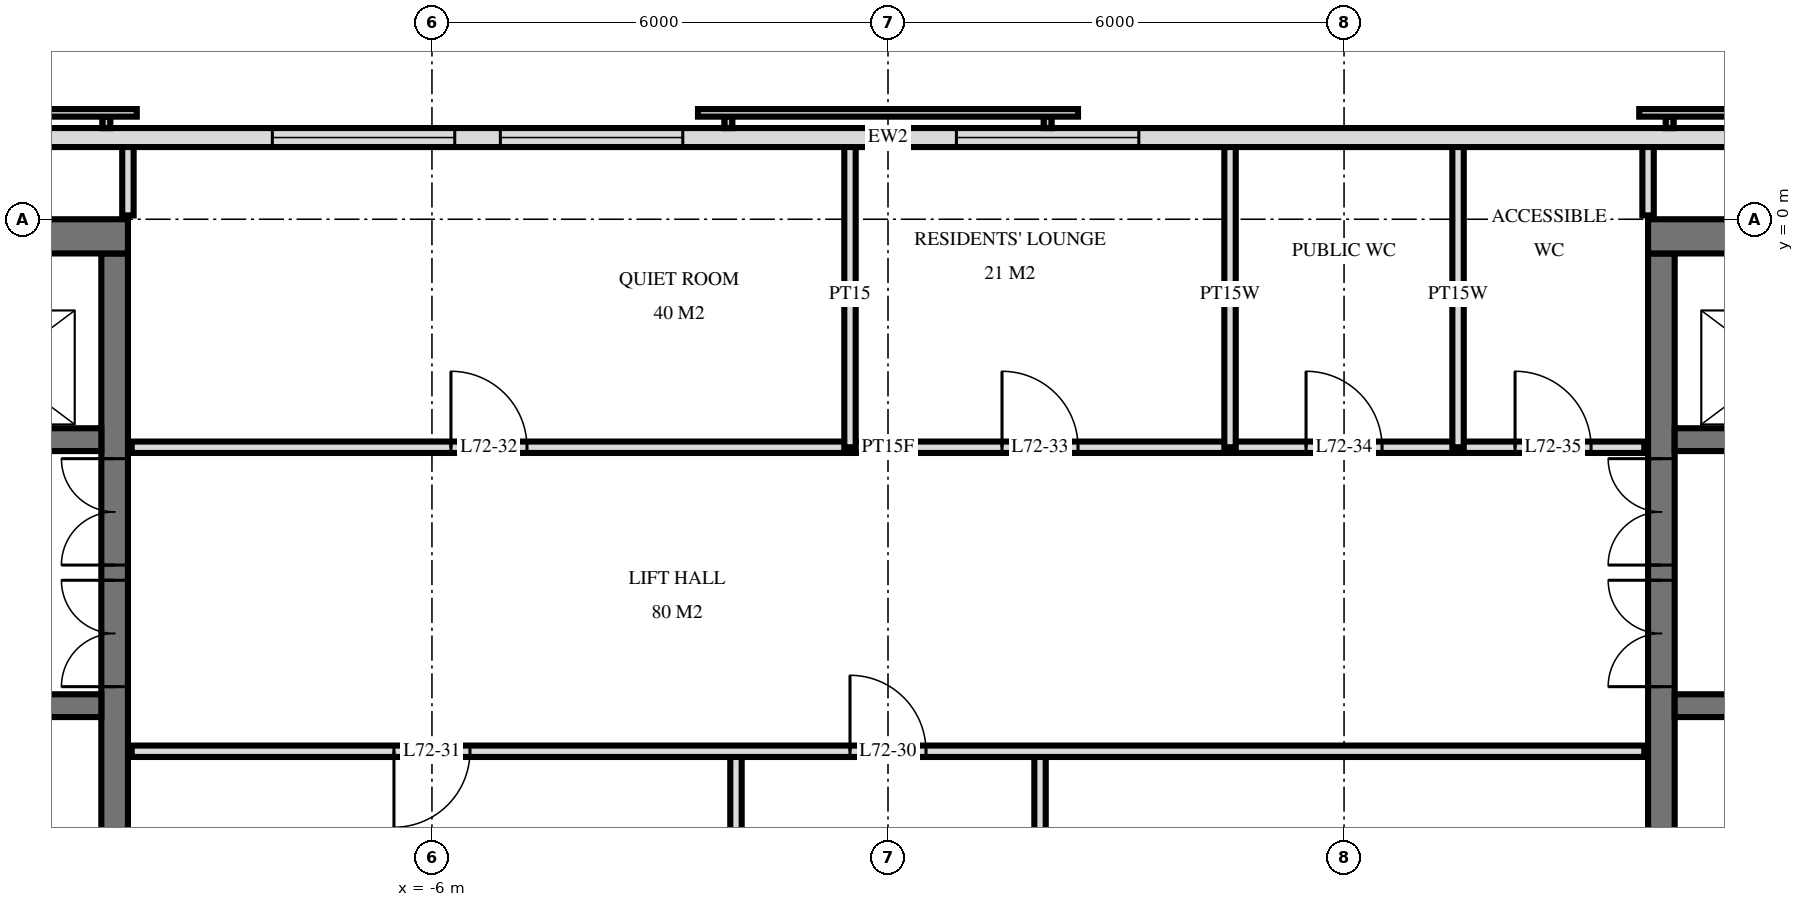
"""IFC4 building model, lengths in metres.
Left out: names, types, materials, properties, quantities, classifications, styles, units other than length and angle.
Written with IfcOpenShell. Run it as: python <this file> out.ifc"""

import sys

from ifc_helpers import new_model, si_unit, direction, frame, frame_2d, origin, place, context, subcontext, project, spatial, rectangle, extrude, element, fill, save


model = new_model("IFC4")
c1 = context("Model", 3, precision=1e-05, world=origin(), true_north=direction((0.0, 1.0)))
c2 = subcontext(c1, "Body", "Model", "MODEL_VIEW")
j1 = project(units=[si_unit("LENGTHUNIT", "METRE"), si_unit("PLANEANGLEUNIT", "RADIAN")], contexts=[c1])
p1 = place(None, origin())
s1 = spatial("IfcSite", under=j1, at=p1, CompositionType="ELEMENT")
p2 = place(p1, origin())
s2 = spatial("IfcBuilding", under=s1, at=p2, CompositionType="ELEMENT")
p3 = place(p2, frame((0.0, 0.0, 273.6)))
s3 = spatial("IfcBuildingStorey", under=s2, at=p3, CompositionType="ELEMENT", Elevation=273.6)
p4 = place(p3, frame((-19.5, -0.225, 0.0), z_axis=(0.0, 0.0, 1.0), x_axis=(1.0, 0.0, 0.0)))
e1 = element("IfcWall", 1, at=p4, inside=s3, PredefinedType="SHEAR", context=c2, shape_type="SweptSolid", body=[
    extrude(rectangle(XDim=9.5, YDim=0.45, at=frame_2d((4.75, 0.0))), origin(), (0.0, 0.0, 1.0), 3.5),
])
p5 = place(p3, frame((-10.175, -14.55, 0.0), z_axis=(0.0, 0.0, 1.0), x_axis=(0.0, 1.0, 0.0)))
e2 = element("IfcWall", 2, at=p5, inside=s3, PredefinedType="SHEAR", context=c2, shape_type="SweptSolid", body=[
    extrude(rectangle(XDim=14.1, YDim=0.35, at=frame_2d((7.05, 0.0))), origin(), (0.0, 0.0, 1.0), 3.5),
])
p6 = place(p5, frame((8.4, 0.0, 0.0)))
e3 = element("IfcOpeningElement", 3, at=p6, cuts=e2, PredefinedType="OPENING", context=c2, shape_type="SweptSolid", body=[
    extrude(rectangle(XDim=1.4, YDim=2.4, at=frame_2d((0.7, 1.2))), frame((0.0, 0.185, 0.0), z_axis=(0.0, -1.0, 0.0), x_axis=(1.0, 0.0, 0.0)), (0.0, 0.0, 1.0), 0.37),
])
p7 = place(p5, frame((10.0, 0.0, 0.0)))
e4 = element("IfcOpeningElement", 4, at=p7, cuts=e2, PredefinedType="OPENING", context=c2, shape_type="SweptSolid", body=[
    extrude(rectangle(XDim=1.4, YDim=2.4, at=frame_2d((0.7, 1.2))), frame((0.0, 0.185, 0.0), z_axis=(0.0, -1.0, 0.0), x_axis=(1.0, 0.0, 0.0)), (0.0, 0.0, 1.0), 0.37),
])
p8 = place(p5, frame((4.0, 0.0, 0.0)))
e5 = element("IfcOpeningElement", 5, at=p8, cuts=e2, PredefinedType="OPENING", context=c2, shape_type="SweptSolid", body=[
    extrude(rectangle(XDim=1.2, YDim=2.1, at=frame_2d((0.6, 1.05))), frame((0.0, 0.185, 0.0), z_axis=(0.0, -1.0, 0.0), x_axis=(1.0, 0.0, 0.0)), (0.0, 0.0, 1.0), 0.37),
])
p9 = place(p3, frame((-19.05, -2.9, 0.0), z_axis=(0.0, 0.0, 1.0), x_axis=(1.0, 0.0, 0.0)))
e6 = element("IfcWall", 6, at=p9, inside=s3, PredefinedType="SHEAR", context=c2, shape_type="SweptSolid", body=[
    extrude(rectangle(XDim=8.7, YDim=0.3, at=frame_2d((4.35, 0.0))), origin(), (0.0, 0.0, 1.0), 3.5),
])
p10 = place(p9, frame((6.8, 0.0, 0.0)))
e7 = element("IfcOpeningElement", 7, at=p10, cuts=e6, PredefinedType="OPENING", context=c2, shape_type="SweptSolid", body=[
    extrude(rectangle(XDim=1.1, YDim=2.1, at=frame_2d((0.55, 1.05))), frame((0.0, 0.16, 0.0), z_axis=(0.0, -1.0, 0.0), x_axis=(1.0, 0.0, 0.0)), (0.0, 0.0, 1.0), 0.32),
])
p11 = place(p9, frame((3.8, 0.0, 0.0)))
e8 = element("IfcOpeningElement", 8, at=p11, cuts=e6, PredefinedType="OPENING", context=c2, shape_type="SweptSolid", body=[
    extrude(rectangle(XDim=1.1, YDim=2.1, at=frame_2d((0.55, 1.05))), frame((0.0, 0.16, 0.0), z_axis=(0.0, -1.0, 0.0), x_axis=(1.0, 0.0, 0.0)), (0.0, 0.0, 1.0), 0.32),
])
p12 = place(p9, frame((0.9, 0.0, 0.0)))
e9 = element("IfcOpeningElement", 9, at=p12, cuts=e6, PredefinedType="OPENING", context=c2, shape_type="SweptSolid", body=[
    extrude(rectangle(XDim=0.9, YDim=2.1, at=frame_2d((0.45, 1.05))), frame((0.0, 0.16, 0.0), z_axis=(0.0, -1.0, 0.0), x_axis=(1.0, 0.0, 0.0)), (0.0, 0.0, 1.0), 0.32),
])
p13 = place(p3, frame((-19.05, -6.4, 0.0), z_axis=(0.0, 0.0, 1.0), x_axis=(1.0, 0.0, 0.0)))
e10 = element("IfcWall", 10, at=p13, inside=s3, PredefinedType="SHEAR", context=c2, shape_type="SweptSolid", body=[
    extrude(rectangle(XDim=8.7, YDim=0.3, at=frame_2d((4.35, 0.0))), origin(), (0.0, 0.0, 1.0), 3.5),
])
p14 = place(p13, frame((0.8, 0.0, 0.0)))
e11 = element("IfcOpeningElement", 11, at=p14, cuts=e10, PredefinedType="OPENING", context=c2, shape_type="SweptSolid", body=[
    extrude(rectangle(XDim=1.1, YDim=2.1, at=frame_2d((0.55, 1.05))), frame((0.0, 0.16, 0.0), z_axis=(0.0, -1.0, 0.0), x_axis=(1.0, 0.0, 0.0)), (0.0, 0.0, 1.0), 0.32),
])
p15 = place(p3, frame((10.0, -0.225, 0.0), z_axis=(0.0, 0.0, 1.0), x_axis=(1.0, 0.0, 0.0)))
e12 = element("IfcWall", 12, at=p15, inside=s3, PredefinedType="SHEAR", context=c2, shape_type="SweptSolid", body=[
    extrude(rectangle(XDim=9.5, YDim=0.45, at=frame_2d((4.75, 0.0))), origin(), (0.0, 0.0, 1.0), 3.5),
])
p16 = place(p3, frame((10.175, -14.55, 0.0), z_axis=(0.0, 0.0, 1.0), x_axis=(0.0, 1.0, 0.0)))
e13 = element("IfcWall", 13, at=p16, inside=s3, PredefinedType="SHEAR", context=c2, shape_type="SweptSolid", body=[
    extrude(rectangle(XDim=14.1, YDim=0.35, at=frame_2d((7.05, 0.0))), origin(), (0.0, 0.0, 1.0), 3.5),
])
p17 = place(p16, frame((8.4, 0.0, 0.0)))
e14 = element("IfcOpeningElement", 14, at=p17, cuts=e13, PredefinedType="OPENING", context=c2, shape_type="SweptSolid", body=[
    extrude(rectangle(XDim=1.4, YDim=2.4, at=frame_2d((0.7, 1.2))), frame((0.0, 0.185, 0.0), z_axis=(0.0, -1.0, 0.0), x_axis=(1.0, 0.0, 0.0)), (0.0, 0.0, 1.0), 0.37),
])
p18 = place(p16, frame((10.0, 0.0, 0.0)))
e15 = element("IfcOpeningElement", 15, at=p18, cuts=e13, PredefinedType="OPENING", context=c2, shape_type="SweptSolid", body=[
    extrude(rectangle(XDim=1.4, YDim=2.4, at=frame_2d((0.7, 1.2))), frame((0.0, 0.185, 0.0), z_axis=(0.0, -1.0, 0.0), x_axis=(1.0, 0.0, 0.0)), (0.0, 0.0, 1.0), 0.37),
])
p19 = place(p16, frame((4.0, 0.0, 0.0)))
e16 = element("IfcOpeningElement", 16, at=p19, cuts=e13, PredefinedType="OPENING", context=c2, shape_type="SweptSolid", body=[
    extrude(rectangle(XDim=1.2, YDim=2.1, at=frame_2d((0.6, 1.05))), frame((0.0, 0.185, 0.0), z_axis=(0.0, -1.0, 0.0), x_axis=(1.0, 0.0, 0.0)), (0.0, 0.0, 1.0), 0.37),
])
p20 = place(p3, frame((10.35, -2.9, 0.0), z_axis=(0.0, 0.0, 1.0), x_axis=(1.0, 0.0, 0.0)))
e17 = element("IfcWall", 17, at=p20, inside=s3, PredefinedType="SHEAR", context=c2, shape_type="SweptSolid", body=[
    extrude(rectangle(XDim=8.7, YDim=0.3, at=frame_2d((4.35, 0.0))), origin(), (0.0, 0.0, 1.0), 3.5),
])
p21 = place(p20, frame((0.8, 0.0, 0.0)))
e18 = element("IfcOpeningElement", 18, at=p21, cuts=e17, PredefinedType="OPENING", context=c2, shape_type="SweptSolid", body=[
    extrude(rectangle(XDim=1.1, YDim=2.1, at=frame_2d((0.55, 1.05))), frame((0.0, 0.16, 0.0), z_axis=(0.0, -1.0, 0.0), x_axis=(1.0, 0.0, 0.0)), (0.0, 0.0, 1.0), 0.32),
])
p22 = place(p20, frame((3.8, 0.0, 0.0)))
e19 = element("IfcOpeningElement", 19, at=p22, cuts=e17, PredefinedType="OPENING", context=c2, shape_type="SweptSolid", body=[
    extrude(rectangle(XDim=1.1, YDim=2.1, at=frame_2d((0.55, 1.05))), frame((0.0, 0.16, 0.0), z_axis=(0.0, -1.0, 0.0), x_axis=(1.0, 0.0, 0.0)), (0.0, 0.0, 1.0), 0.32),
])
p23 = place(p20, frame((6.9, 0.0, 0.0)))
e20 = element("IfcOpeningElement", 20, at=p23, cuts=e17, PredefinedType="OPENING", context=c2, shape_type="SweptSolid", body=[
    extrude(rectangle(XDim=0.9, YDim=2.1, at=frame_2d((0.45, 1.05))), frame((0.0, 0.16, 0.0), z_axis=(0.0, -1.0, 0.0), x_axis=(1.0, 0.0, 0.0)), (0.0, 0.0, 1.0), 0.32),
])
p24 = place(p3, frame((10.35, -6.4, 0.0), z_axis=(0.0, 0.0, 1.0), x_axis=(1.0, 0.0, 0.0)))
e21 = element("IfcWall", 21, at=p24, inside=s3, PredefinedType="SHEAR", context=c2, shape_type="SweptSolid", body=[
    extrude(rectangle(XDim=8.7, YDim=0.3, at=frame_2d((4.35, 0.0))), origin(), (0.0, 0.0, 1.0), 3.5),
])
p25 = place(p24, frame((6.8, 0.0, 0.0)))
e22 = element("IfcOpeningElement", 22, at=p25, cuts=e21, PredefinedType="OPENING", context=c2, shape_type="SweptSolid", body=[
    extrude(rectangle(XDim=1.1, YDim=2.1, at=frame_2d((0.55, 1.05))), frame((0.0, 0.16, 0.0), z_axis=(0.0, -1.0, 0.0), x_axis=(1.0, 0.0, 0.0)), (0.0, 0.0, 1.0), 0.32),
])
p26 = place(p3, frame((18.575, 1.075, 0.0), z_axis=(0.0, 0.0, 1.0), x_axis=(-1.0, 0.0, 0.0)))
e23 = element("IfcWall", 23, at=p26, inside=s3, PredefinedType="SOLIDWALL", context=c2, shape_type="SweptSolid", body=[
    extrude(rectangle(XDim=37.151, YDim=0.25, at=frame_2d((18.575, 0.0))), origin(), (0.0, 0.0, 1.0), 3.22),
])
p27 = place(p26, frame((15.275, 0.0, 0.9)))
e24 = element("IfcOpeningElement", 24, at=p27, cuts=e23, PredefinedType="OPENING", context=c2, shape_type="SweptSolid", body=[
    extrude(rectangle(XDim=2.4, YDim=1.5, at=frame_2d((1.2, 0.75))), frame((0.0, 0.135, 0.0), z_axis=(0.0, -1.0, 0.0), x_axis=(1.0, 0.0, 0.0)), (0.0, 0.0, 1.0), 0.27),
])
p28 = place(p26, frame((21.275, 0.0, 0.9)))
e25 = element("IfcOpeningElement", 25, at=p28, cuts=e23, PredefinedType="OPENING", context=c2, shape_type="SweptSolid", body=[
    extrude(rectangle(XDim=2.4, YDim=1.5, at=frame_2d((1.2, 0.75))), frame((0.0, 0.135, 0.0), z_axis=(0.0, -1.0, 0.0), x_axis=(1.0, 0.0, 0.0)), (0.0, 0.0, 1.0), 0.27),
])
p29 = place(p26, frame((24.275, 0.0, 0.9)))
e26 = element("IfcOpeningElement", 26, at=p29, cuts=e23, PredefinedType="OPENING", context=c2, shape_type="SweptSolid", body=[
    extrude(rectangle(XDim=2.4, YDim=1.5, at=frame_2d((1.2, 0.75))), frame((0.0, 0.135, 0.0), z_axis=(0.0, -1.0, 0.0), x_axis=(1.0, 0.0, 0.0)), (0.0, 0.0, 1.0), 0.27),
])
p30 = place(p3, frame((10.0, 0.05, 0.0), z_axis=(0.0, 0.0, 1.0), x_axis=(0.0, 1.0, 0.0)))
e27 = element("IfcWall", 27, at=p30, inside=s3, PredefinedType="PLUMBINGWALL", context=c2, shape_type="SweptSolid", body=[
    extrude(rectangle(XDim=0.97, YDim=0.15, at=frame_2d((0.485, 0.0))), origin(), (0.0, 0.0, 1.0), 3.22),
])
for number, where, z_axis, x_axis in (
    (28, (7.5, -3.0, 0.0), (0.0, 0.0, 1.0), (0.0, 1.0, 0.0)),
    (29, (4.5, -3.0, 0.0), (0.0, 0.0, 1.0), (0.0, 1.0, 0.0)),
):
    element("IfcWall", number, at=place(p3, frame(where, z_axis=z_axis, x_axis=x_axis)), inside=s3, PredefinedType="PLUMBINGWALL", context=c2, shape_type="SweptSolid", body=[
        extrude(rectangle(XDim=4.02, YDim=0.15, at=frame_2d((2.01, 0.0))), origin(), (0.0, 0.0, 1.0), 3.22),
    ])
p31 = place(p3, frame((2.0, -11.0, 0.0), z_axis=(0.0, 0.0, 1.0), x_axis=(0.0, 1.0, 0.0)))
e30 = element("IfcWall", 30, at=p31, inside=s3, PredefinedType="PARTITIONING", context=c2, shape_type="SweptSolid", body=[
    extrude(rectangle(XDim=4.0, YDim=0.15, at=frame_2d((2.0, 0.0))), origin(), (0.0, 0.0, 1.0), 3.22),
])
p32 = place(p3, frame((-0.5, -3.0, 0.0), z_axis=(0.0, 0.0, 1.0), x_axis=(0.0, 1.0, 0.0)))
e31 = element("IfcWall", 31, at=p32, inside=s3, PredefinedType="PARTITIONING", context=c2, shape_type="SweptSolid", body=[
    extrude(rectangle(XDim=4.02, YDim=0.15, at=frame_2d((2.01, 0.0))), origin(), (0.0, 0.0, 1.0), 3.22),
])
p33 = place(p3, frame((-2.0, -11.0, 0.0), z_axis=(0.0, 0.0, 1.0), x_axis=(0.0, 1.0, 0.0)))
e32 = element("IfcWall", 32, at=p33, inside=s3, PredefinedType="PARTITIONING", context=c2, shape_type="SweptSolid", body=[
    extrude(rectangle(XDim=4.0, YDim=0.15, at=frame_2d((2.0, 0.0))), origin(), (0.0, 0.0, 1.0), 3.22),
])
p34 = place(p3, frame((-10.0, 0.05, 0.0), z_axis=(0.0, 0.0, 1.0), x_axis=(0.0, 1.0, 0.0)))
e33 = element("IfcWall", 33, at=p34, inside=s3, PredefinedType="PARTITIONING", context=c2, shape_type="SweptSolid", body=[
    extrude(rectangle(XDim=0.97, YDim=0.15, at=frame_2d((0.485, 0.0))), origin(), (0.0, 0.0, 1.0), 3.22),
])
p35 = place(p3, frame((-9.95, -7.0, 0.0), z_axis=(0.0, 0.0, 1.0), x_axis=(1.0, 0.0, 0.0)))
e34 = element("IfcWall", 34, at=p35, inside=s3, PredefinedType="PARTITIONING", context=c2, shape_type="SweptSolid", body=[
    extrude(rectangle(XDim=19.9, YDim=0.15, at=frame_2d((9.95, 0.0))), origin(), (0.0, 0.0, 1.0), 3.22),
])
p36 = place(p35, frame((9.45, 0.0, 0.0)))
e35 = element("IfcOpeningElement", 35, at=p36, cuts=e34, PredefinedType="OPENING", context=c2, shape_type="SweptSolid", body=[
    extrude(rectangle(XDim=1.0, YDim=2.1, at=frame_2d((0.5, 1.05))), frame((0.0, 0.085, 0.0), z_axis=(0.0, -1.0, 0.0), x_axis=(1.0, 0.0, 0.0)), (0.0, 0.0, 1.0), 0.17),
])
p37 = place(p35, frame((3.45, 0.0, 0.0)))
e36 = element("IfcOpeningElement", 36, at=p37, cuts=e34, PredefinedType="OPENING", context=c2, shape_type="SweptSolid", body=[
    extrude(rectangle(XDim=1.0, YDim=2.1, at=frame_2d((0.5, 1.05))), frame((0.0, 0.085, 0.0), z_axis=(0.0, -1.0, 0.0), x_axis=(1.0, 0.0, 0.0)), (0.0, 0.0, 1.0), 0.17),
])
p38 = place(p3, frame((-9.95, -3.0, 0.0), z_axis=(0.0, 0.0, 1.0), x_axis=(1.0, 0.0, 0.0)))
e37 = element("IfcWall", 37, at=p38, inside=s3, PredefinedType="PARTITIONING", context=c2, shape_type="SweptSolid", body=[
    extrude(rectangle(XDim=19.9, YDim=0.15, at=frame_2d((9.95, 0.0))), origin(), (0.0, 0.0, 1.0), 3.22),
])
p39 = place(p38, frame((4.2, 0.0, 0.0)))
e38 = element("IfcOpeningElement", 38, at=p39, cuts=e37, PredefinedType="OPENING", context=c2, shape_type="SweptSolid", body=[
    extrude(rectangle(XDim=1.0, YDim=2.1, at=frame_2d((0.5, 1.05))), frame((0.0, 0.085, 0.0), z_axis=(0.0, -1.0, 0.0), x_axis=(1.0, 0.0, 0.0)), (0.0, 0.0, 1.0), 0.17),
])
p40 = place(p38, frame((11.45, 0.0, 0.0)))
e39 = element("IfcOpeningElement", 39, at=p40, cuts=e37, PredefinedType="OPENING", context=c2, shape_type="SweptSolid", body=[
    extrude(rectangle(XDim=1.0, YDim=2.1, at=frame_2d((0.5, 1.05))), frame((0.0, 0.085, 0.0), z_axis=(0.0, -1.0, 0.0), x_axis=(1.0, 0.0, 0.0)), (0.0, 0.0, 1.0), 0.17),
])
p41 = place(p38, frame((15.45, 0.0, 0.0)))
e40 = element("IfcOpeningElement", 40, at=p41, cuts=e37, PredefinedType="OPENING", context=c2, shape_type="SweptSolid", body=[
    extrude(rectangle(XDim=1.0, YDim=2.1, at=frame_2d((0.5, 1.05))), frame((0.0, 0.085, 0.0), z_axis=(0.0, -1.0, 0.0), x_axis=(1.0, 0.0, 0.0)), (0.0, 0.0, 1.0), 0.17),
])
p42 = place(p38, frame((18.2, 0.0, 0.0)))
e41 = element("IfcOpeningElement", 41, at=p42, cuts=e37, PredefinedType="OPENING", context=c2, shape_type="SweptSolid", body=[
    extrude(rectangle(XDim=1.0, YDim=2.1, at=frame_2d((0.5, 1.05))), frame((0.0, 0.085, 0.0), z_axis=(0.0, -1.0, 0.0), x_axis=(1.0, 0.0, 0.0)), (0.0, 0.0, 1.0), 0.17),
])
p43 = place(p27, origin())
e42 = element("IfcWindow", 42, at=p43, inside=s3, PartitioningType="SINGLE_PANEL", PredefinedType="WINDOW", context=c2, shape_type="SweptSolid", body=[
    extrude(rectangle(XDim=2.4, YDim=1.5, at=frame_2d((1.2, 0.75))), frame((0.0, 0.03, 0.0), z_axis=(0.0, -1.0, 0.0), x_axis=(1.0, 0.0, 0.0)), (0.0, 0.0, 1.0), 0.06),
])
fill(e24, e42)
p44 = place(p28, origin())
e43 = element("IfcWindow", 43, at=p44, inside=s3, PartitioningType="SINGLE_PANEL", PredefinedType="WINDOW", context=c2, shape_type="SweptSolid", body=[
    extrude(rectangle(XDim=2.4, YDim=1.5, at=frame_2d((1.2, 0.75))), frame((0.0, 0.03, 0.0), z_axis=(0.0, -1.0, 0.0), x_axis=(1.0, 0.0, 0.0)), (0.0, 0.0, 1.0), 0.06),
])
fill(e25, e43)
p45 = place(p29, origin())
e44 = element("IfcWindow", 44, at=p45, inside=s3, PartitioningType="SINGLE_PANEL", PredefinedType="WINDOW", context=c2, shape_type="SweptSolid", body=[
    extrude(rectangle(XDim=2.4, YDim=1.5, at=frame_2d((1.2, 0.75))), frame((0.0, 0.03, 0.0), z_axis=(0.0, -1.0, 0.0), x_axis=(1.0, 0.0, 0.0)), (0.0, 0.0, 1.0), 0.06),
])
fill(e26, e44)
p46 = place(p6, origin())
e45 = element("IfcDoor", 45, at=p46, inside=s3, OperationType="DOUBLE_DOOR_SINGLE_SWING", PredefinedType="DOOR", context=c2, shape_type="SweptSolid", body=[
    extrude(rectangle(XDim=1.4, YDim=2.4, at=frame_2d((0.7, 1.2))), frame((0.0, 0.025, 0.0), z_axis=(0.0, -1.0, 0.0), x_axis=(1.0, 0.0, 0.0)), (0.0, 0.0, 1.0), 0.05),
])
fill(e3, e45)
p47 = place(p7, origin())
e46 = element("IfcDoor", 46, at=p47, inside=s3, OperationType="DOUBLE_DOOR_SINGLE_SWING", PredefinedType="DOOR", context=c2, shape_type="SweptSolid", body=[
    extrude(rectangle(XDim=1.4, YDim=2.4, at=frame_2d((0.7, 1.2))), frame((0.0, 0.025, 0.0), z_axis=(0.0, -1.0, 0.0), x_axis=(1.0, 0.0, 0.0)), (0.0, 0.0, 1.0), 0.05),
])
fill(e4, e46)
p48 = place(p17, origin())
e47 = element("IfcDoor", 47, at=p48, inside=s3, OperationType="DOUBLE_DOOR_SINGLE_SWING", PredefinedType="DOOR", context=c2, shape_type="SweptSolid", body=[
    extrude(rectangle(XDim=1.4, YDim=2.4, at=frame_2d((0.7, 1.2))), frame((0.0, 0.025, 0.0), z_axis=(0.0, -1.0, 0.0), x_axis=(1.0, 0.0, 0.0)), (0.0, 0.0, 1.0), 0.05),
])
fill(e14, e47)
p49 = place(p18, origin())
e48 = element("IfcDoor", 48, at=p49, inside=s3, OperationType="DOUBLE_DOOR_SINGLE_SWING", PredefinedType="DOOR", context=c2, shape_type="SweptSolid", body=[
    extrude(rectangle(XDim=1.4, YDim=2.4, at=frame_2d((0.7, 1.2))), frame((0.0, 0.025, 0.0), z_axis=(0.0, -1.0, 0.0), x_axis=(1.0, 0.0, 0.0)), (0.0, 0.0, 1.0), 0.05),
])
fill(e15, e48)
p50 = place(p36, origin())
e49 = element("IfcDoor", 49, at=p50, inside=s3, OperationType="SINGLE_SWING_RIGHT", PredefinedType="DOOR", context=c2, shape_type="SweptSolid", body=[
    extrude(rectangle(XDim=1.0, YDim=2.1, at=frame_2d((0.5, 1.05))), frame((0.0, 0.025, 0.0), z_axis=(0.0, -1.0, 0.0), x_axis=(1.0, 0.0, 0.0)), (0.0, 0.0, 1.0), 0.05),
])
fill(e35, e49)
p51 = place(p37, frame((0.5, 0.0, 0.0), z_axis=(0.0, 0.0, 1.0), x_axis=(-1.0, 0.0, 0.0)))
e50 = element("IfcDoor", 50, at=p51, inside=s3, OperationType="SINGLE_SWING_LEFT", PredefinedType="DOOR", context=c2, shape_type="SweptSolid", body=[
    extrude(rectangle(XDim=1.0, YDim=2.1, at=frame_2d((0.0, 1.05))), frame((0.0, -0.025, 0.0), z_axis=(0.0, 1.0, 0.0), x_axis=(-1.0, 0.0, 0.0)), (0.0, 0.0, 1.0), 0.05),
])
fill(e36, e50)
p52 = place(p39, origin())
e51 = element("IfcDoor", 51, at=p52, inside=s3, OperationType="SINGLE_SWING_RIGHT", PredefinedType="DOOR", context=c2, shape_type="SweptSolid", body=[
    extrude(rectangle(XDim=1.0, YDim=2.1, at=frame_2d((0.5, 1.05))), frame((0.0, 0.025, 0.0), z_axis=(0.0, -1.0, 0.0), x_axis=(1.0, 0.0, 0.0)), (0.0, 0.0, 1.0), 0.05),
])
fill(e38, e51)
p53 = place(p40, origin())
e52 = element("IfcDoor", 52, at=p53, inside=s3, OperationType="SINGLE_SWING_RIGHT", PredefinedType="DOOR", context=c2, shape_type="SweptSolid", body=[
    extrude(rectangle(XDim=1.0, YDim=2.1, at=frame_2d((0.5, 1.05))), frame((0.0, 0.025, 0.0), z_axis=(0.0, -1.0, 0.0), x_axis=(1.0, 0.0, 0.0)), (0.0, 0.0, 1.0), 0.05),
])
fill(e39, e52)
p54 = place(p41, origin())
e53 = element("IfcDoor", 53, at=p54, inside=s3, OperationType="SINGLE_SWING_RIGHT", PredefinedType="DOOR", context=c2, shape_type="SweptSolid", body=[
    extrude(rectangle(XDim=1.0, YDim=2.1, at=frame_2d((0.5, 1.05))), frame((0.0, 0.025, 0.0), z_axis=(0.0, -1.0, 0.0), x_axis=(1.0, 0.0, 0.0)), (0.0, 0.0, 1.0), 0.05),
])
fill(e40, e53)
p55 = place(p42, origin())
e54 = element("IfcDoor", 54, at=p55, inside=s3, OperationType="SINGLE_SWING_RIGHT", PredefinedType="DOOR", context=c2, shape_type="SweptSolid", body=[
    extrude(rectangle(XDim=1.0, YDim=2.1, at=frame_2d((0.5, 1.05))), frame((0.0, 0.025, 0.0), z_axis=(0.0, -1.0, 0.0), x_axis=(1.0, 0.0, 0.0)), (0.0, 0.0, 1.0), 0.05),
])
fill(e41, e54)
save(model, sys.argv[1])
